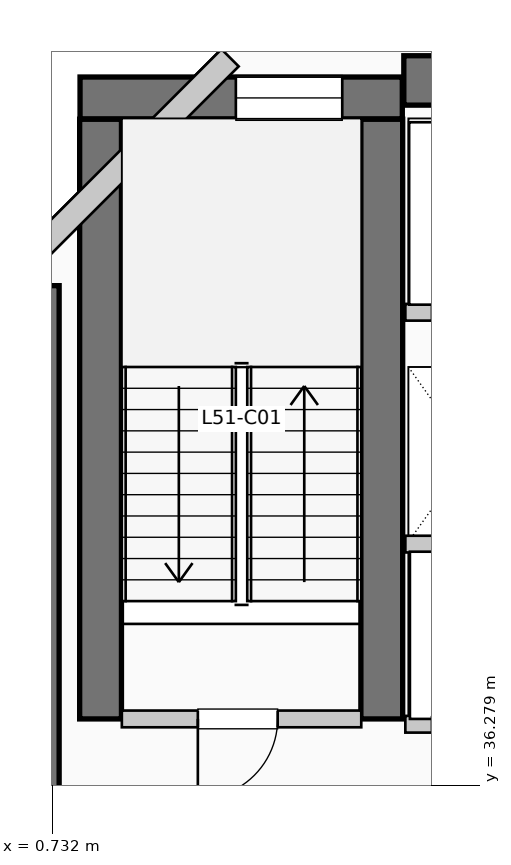
"""IFC4 building model, lengths in metres.
Left out: names, types, materials, properties, quantities, classifications, styles, units other than length and angle.
Written with IfcOpenShell. Run it as: python <this file> out.ifc"""

import sys

from ifc_helpers import new_model, si_unit, direction, frame, frame_2d, origin, place, context, subcontext, project, spatial, rectangle, extrude, element, fill, save


model = new_model("IFC4")
c1 = context("Model", 3, precision=1e-05, world=origin(), true_north=direction((0.0, 1.0)))
c2 = subcontext(c1, "Body", "Model", "MODEL_VIEW")
j1 = project(units=[si_unit("LENGTHUNIT", "METRE"), si_unit("PLANEANGLEUNIT", "RADIAN")], contexts=[c1])
p1 = place(None, origin())
s1 = spatial("IfcSite", under=j1, at=p1, CompositionType="ELEMENT")
p2 = place(p1, origin())
s2 = spatial("IfcBuilding", under=s1, at=p2, CompositionType="ELEMENT")
p3 = place(p2, frame((0.0, 0.0, 211.2)))
s3 = spatial("IfcBuildingStorey", under=s2, at=p3, CompositionType="ELEMENT", Elevation=211.2)
p4 = place(p3, frame((5.36, 45.55, 0.0), z_axis=(0.0, 0.0, 1.0), x_axis=(1.0, 0.0, 0.0)))
e1 = element("IfcWall", 1, at=p4, inside=s3, PredefinedType="SHEAR", context=c2, shape_type="SweptSolid", body=[
    extrude(rectangle(XDim=13.98, YDim=0.65, at=frame_2d((6.99, 0.0))), origin(), (0.0, 0.0, 1.0), 3.96),
])
p5 = place(p3, frame((0.5, 34.95, 0.0), z_axis=(0.0, 0.0, 1.0), x_axis=(0.0, 1.0, 0.0)))
e2 = element("IfcWall", 2, at=p5, inside=s3, PredefinedType="SHEAR", context=c2, shape_type="SweptSolid", body=[
    extrude(rectangle(XDim=7.9, YDim=0.65, at=frame_2d((3.95, 0.0))), origin(), (0.0, 0.0, 1.0), 3.96),
])
for number, where, z_axis, x_axis in (
    (3, (1.37, 37.15, 0.0), (0.0, 0.0, 1.0), (0.0, 1.0, 0.0)),
    (4, (5.07, 37.15, 0.0), (0.0, 0.0, 1.0), (0.0, 1.0, 0.0)),
):
    element("IfcWall", number, at=place(p3, frame(where, z_axis=z_axis, x_axis=x_axis)), inside=s3, PredefinedType="SHEAR", context=c2, shape_type="SweptSolid", body=[
        extrude(rectangle(XDim=7.89, YDim=0.55, at=frame_2d((3.945, 0.0))), origin(), (0.0, 0.0, 1.0), 3.96),
    ])
p6 = place(p3, frame((1.1, 45.32, 0.0), z_axis=(0.0, 0.0, 1.0), x_axis=(1.0, 0.0, 0.0)))
e5 = element("IfcWall", 5, at=p6, inside=s3, PredefinedType="SHEAR", context=c2, shape_type="SweptSolid", body=[
    extrude(rectangle(XDim=4.24, YDim=0.55, at=frame_2d((2.12, 0.0))), origin(), (0.0, 0.0, 1.0), 3.96),
])
p7 = place(p6, frame((2.05, 0.0, 1.05)))
e6 = element("IfcOpeningElement", 6, at=p7, cuts=e5, PredefinedType="OPENING", context=c2, shape_type="SweptSolid", body=[
    extrude(rectangle(XDim=1.4, YDim=1.8, at=frame_2d((0.7, 0.9))), frame((0.0, 0.285, 0.0), z_axis=(0.0, -1.0, 0.0), x_axis=(1.0, 0.0, 0.0)), (0.0, 0.0, 1.0), 0.57),
])
p8 = place(p3, frame((3.074, 45.848, 0.0), z_axis=(0.0, 0.0, 1.0), x_axis=(-0.707106781187, -0.707106781187, 0.0)))
e7 = element("IfcWall", 7, at=p8, inside=s3, PredefinedType="SOLIDWALL", context=c2, shape_type="SweptSolid", body=[
    extrude(rectangle(XDim=4.133, YDim=0.32, at=frame_2d((2.066, 0.0))), origin(), (0.0, 0.0, 1.0), 3.71),
])
p9 = place(p3, frame((1.65, 37.15, 0.0), z_axis=(0.0, 0.0, 1.0), x_axis=(1.0, 0.0, 0.0)))
e8 = element("IfcWall", 8, at=p9, inside=s3, PredefinedType="PARTITIONING", context=c2, shape_type="SweptSolid", body=[
    extrude(rectangle(XDim=3.15, YDim=0.22, at=frame_2d((1.575, 0.0))), origin(), (0.0, 0.0, 1.0), 3.71),
])
p10 = place(p9, frame((2.05, 0.0, 0.0), z_axis=(0.0, 0.0, 1.0), x_axis=(-1.0, 0.0, 0.0)))
e9 = element("IfcOpeningElement", 9, at=p10, cuts=e8, PredefinedType="OPENING", context=c2, shape_type="SweptSolid", body=[
    extrude(rectangle(XDim=1.05, YDim=2.15, at=frame_2d((0.525, 1.075))), frame((0.0, 0.12, 0.0), z_axis=(0.0, -1.0, 0.0), x_axis=(1.0, 0.0, 0.0)), (0.0, 0.0, 1.0), 0.24),
])
p11 = place(p3, frame((5.38, 37.08, 0.0), z_axis=(0.0, 0.0, 1.0), x_axis=(1.0, 0.0, 0.0)))
e10 = element("IfcWall", 10, at=p11, inside=s3, PredefinedType="PARTITIONING", context=c2, shape_type="SweptSolid", body=[
    extrude(rectangle(XDim=3.46, YDim=0.22, at=frame_2d((1.73, 0.0))), origin(), (0.0, 0.0, 1.0), 3.71),
])
p12 = place(p11, frame((1.55, 0.0, 0.0), z_axis=(0.0, 0.0, 1.0), x_axis=(-1.0, 0.0, 0.0)))
e11 = element("IfcOpeningElement", 11, at=p12, cuts=e10, PredefinedType="OPENING", context=c2, shape_type="SweptSolid", body=[
    extrude(rectangle(XDim=1.2, YDim=2.2, at=frame_2d((0.6, 1.1))), frame((0.0, 0.12, 0.0), z_axis=(0.0, -1.0, 0.0), x_axis=(1.0, 0.0, 0.0)), (0.0, 0.0, 1.0), 0.24),
])
p13 = place(p11, frame((3.22, 0.0, 0.0), z_axis=(0.0, 0.0, 1.0), x_axis=(-1.0, 0.0, 0.0)))
e12 = element("IfcOpeningElement", 12, at=p13, cuts=e10, PredefinedType="OPENING", context=c2, shape_type="SweptSolid", body=[
    extrude(rectangle(XDim=1.2, YDim=2.2, at=frame_2d((0.6, 1.1))), frame((0.0, 0.12, 0.0), z_axis=(0.0, -1.0, 0.0), x_axis=(1.0, 0.0, 0.0)), (0.0, 0.0, 1.0), 0.24),
])
p14 = place(p3, frame((5.38, 39.45, 0.0), z_axis=(0.0, 0.0, 1.0), x_axis=(1.0, 0.0, 0.0)))
e13 = element("IfcWall", 13, at=p14, inside=s3, PredefinedType="PARTITIONING", context=c2, shape_type="SweptSolid", body=[
    extrude(rectangle(XDim=3.46, YDim=0.22, at=frame_2d((1.73, 0.0))), origin(), (0.0, 0.0, 1.0), 3.71),
])
p15 = place(p3, frame((5.38, 42.5, 0.0), z_axis=(0.0, 0.0, 1.0), x_axis=(1.0, 0.0, 0.0)))
e14 = element("IfcWall", 14, at=p15, inside=s3, PredefinedType="PARTITIONING", context=c2, shape_type="SweptSolid", body=[
    extrude(rectangle(XDim=3.77, YDim=0.22, at=frame_2d((1.885, 0.0))), origin(), (0.0, 0.0, 1.0), 3.71),
])
p16 = place(p15, frame((1.75, 0.0, 0.0), z_axis=(0.0, 0.0, 1.0), x_axis=(-1.0, 0.0, 0.0)))
e15 = element("IfcOpeningElement", 15, at=p16, cuts=e14, PredefinedType="OPENING", context=c2, shape_type="SweptSolid", body=[
    extrude(rectangle(XDim=1.4, YDim=2.2, at=frame_2d((0.7, 1.1))), frame((0.0, 0.12, 0.0), z_axis=(0.0, -1.0, 0.0), x_axis=(1.0, 0.0, 0.0)), (0.0, 0.0, 1.0), 0.24),
])
p17 = place(p15, frame((3.53, 0.0, 0.0), z_axis=(0.0, 0.0, 1.0), x_axis=(-1.0, 0.0, 0.0)))
e16 = element("IfcOpeningElement", 16, at=p17, cuts=e14, PredefinedType="OPENING", context=c2, shape_type="SweptSolid", body=[
    extrude(rectangle(XDim=1.4, YDim=2.2, at=frame_2d((0.7, 1.1))), frame((0.0, 0.12, 0.0), z_axis=(0.0, -1.0, 0.0), x_axis=(1.0, 0.0, 0.0)), (0.0, 0.0, 1.0), 0.24),
])
p18 = place(p7, origin())
e17 = element("IfcWindow", 17, at=p18, inside=s3, PartitioningType="SINGLE_PANEL", PredefinedType="WINDOW", context=c2, shape_type="SweptSolid", body=[
    extrude(rectangle(XDim=1.4, YDim=1.8, at=frame_2d((0.7, 0.9))), frame((0.0, 0.03, 0.0), z_axis=(0.0, -1.0, 0.0), x_axis=(1.0, 0.0, 0.0)), (0.0, 0.0, 1.0), 0.06),
])
fill(e6, e17)
p19 = place(p10, origin())
e18 = element("IfcDoor", 18, at=p19, inside=s3, OperationType="SINGLE_SWING_LEFT", PredefinedType="DOOR", context=c2, shape_type="SweptSolid", body=[
    extrude(rectangle(XDim=1.05, YDim=2.15, at=frame_2d((0.525, 1.075))), frame((0.0, 0.025, 0.0), z_axis=(0.0, -1.0, 0.0), x_axis=(1.0, 0.0, 0.0)), (0.0, 0.0, 1.0), 0.05),
])
fill(e9, e18)
save(model, sys.argv[1])
